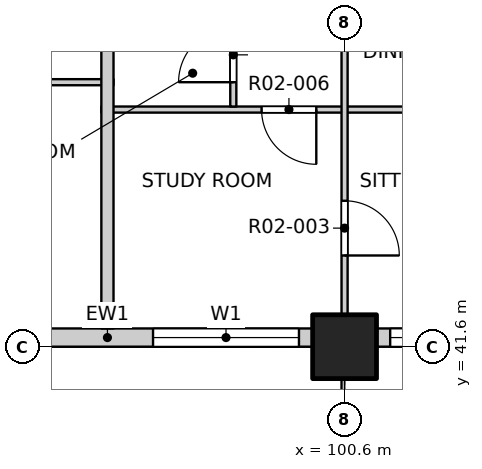
"""IFC4 building model, lengths in metres.
Left out: names, types, materials, properties, quantities, classifications, styles, units other than length and angle.
Written with IfcOpenShell. Run it as: python <this file> out.ifc"""

import sys

from ifc_helpers import new_model, si_unit, direction, frame, frame_2d, origin, origin_2d, place, context, subcontext, project, spatial, rectangle, extrude, element, fill, save


model = new_model("IFC4")
c1 = context("Model", 3, precision=1e-05, world=origin(), true_north=direction((0.0, 1.0)))
c2 = subcontext(c1, "Body", "Model", "MODEL_VIEW")
j1 = project(units=[si_unit("LENGTHUNIT", "METRE"), si_unit("PLANEANGLEUNIT", "RADIAN")], contexts=[c1])
p1 = place(None, origin())
s1 = spatial("IfcSite", under=j1, at=p1, CompositionType="ELEMENT")
p2 = place(p1, origin())
s2 = spatial("IfcBuilding", under=s1, at=p2, CompositionType="ELEMENT")
p3 = place(p2, frame((0.0, 0.0, 29.7)))
s3 = spatial("IfcBuildingStorey", under=s2, at=p3, CompositionType="ELEMENT", Elevation=29.7)
p4 = place(p3, frame((100.6, 41.6, -0.25), z_axis=(0.0, 0.0, 1.0), x_axis=(1.0, 0.0, 0.0)))
e1 = element("IfcColumn", 1, at=p4, inside=s3, PredefinedType="COLUMN", context=c2, shape_type="SweptSolid", body=[
    extrude(rectangle(XDim=1.05, YDim=1.05, at=origin_2d()), origin(), (0.0, 0.0, 1.0), 3.4),
])
p5 = place(p3, frame((93.325, 41.75, 0.0), z_axis=(0.0, 0.0, 1.0), x_axis=(1.0, 0.0, 0.0)))
e2 = element("IfcWall", 2, at=p5, inside=s3, PredefinedType="SOLIDWALL", context=c2, shape_type="SweptSolid", body=[
    extrude(rectangle(XDim=6.75, YDim=0.3, at=frame_2d((3.375, 0.0))), origin(), (0.0, 0.0, 1.0), 2.7),
])
p6 = place(p5, frame((0.525, 0.0, 0.0)))
e3 = element("IfcOpeningElement", 3, at=p6, cuts=e2, PredefinedType="OPENING", context=c2, shape_type="SweptSolid", body=[
    extrude(rectangle(XDim=1.8, YDim=2.4, at=frame_2d((0.9, 1.2))), frame((0.0, 0.16, 0.0), z_axis=(0.0, -1.0, 0.0), x_axis=(1.0, 0.0, 0.0)), (0.0, 0.0, 1.0), 0.32),
])
p7 = place(p5, frame((4.125, 0.0, 0.9)))
e4 = element("IfcOpeningElement", 4, at=p7, cuts=e2, PredefinedType="OPENING", context=c2, shape_type="SweptSolid", body=[
    extrude(rectangle(XDim=2.4, YDim=1.8, at=frame_2d((1.2, 0.9))), frame((0.0, 0.16, 0.0), z_axis=(0.0, -1.0, 0.0), x_axis=(1.0, 0.0, 0.0)), (0.0, 0.0, 1.0), 0.32),
])
p8 = place(p3, frame((101.125, 41.75, 0.0), z_axis=(0.0, 0.0, 1.0), x_axis=(1.0, 0.0, 0.0)))
e5 = element("IfcWall", 5, at=p8, inside=s3, PredefinedType="SOLIDWALL", context=c2, shape_type="SweptSolid", body=[
    extrude(rectangle(XDim=3.375, YDim=0.3, at=frame_2d((1.688, 0.0))), origin(), (0.0, 0.0, 1.0), 2.7),
])
p9 = place(p8, frame((0.225, 0.0, 0.9)))
e6 = element("IfcOpeningElement", 6, at=p9, cuts=e5, PredefinedType="OPENING", context=c2, shape_type="SweptSolid", body=[
    extrude(rectangle(XDim=2.4, YDim=1.8, at=frame_2d((1.2, 0.9))), frame((0.0, 0.16, 0.0), z_axis=(0.0, -1.0, 0.0), x_axis=(1.0, 0.0, 0.0)), (0.0, 0.0, 1.0), 0.32),
])
p10 = place(p3, frame((96.6, 45.5, 0.0), z_axis=(0.0, 0.0, 1.0), x_axis=(1.0, 0.0, 0.0)))
e7 = element("IfcWall", 7, at=p10, inside=s3, PredefinedType="PARTITIONING", context=c2, shape_type="SweptSolid", body=[
    extrude(rectangle(XDim=11.5, YDim=0.1, at=frame_2d((5.75, 0.0))), origin(), (0.0, 0.0, 1.0), 3.15),
])
p11 = place(p10, frame((2.635, 0.0, 0.0)))
e8 = element("IfcOpeningElement", 8, at=p11, cuts=e7, PredefinedType="OPENING", context=c2, shape_type="SweptSolid", body=[
    extrude(rectangle(XDim=0.9, YDim=2.1, at=frame_2d((0.45, 1.05))), frame((0.0, 0.06, 0.0), z_axis=(0.0, -1.0, 0.0), x_axis=(1.0, 0.0, 0.0)), (0.0, 0.0, 1.0), 0.12),
])
p12 = place(p3, frame((81.0, 45.95, 0.0), z_axis=(0.0, 0.0, 1.0), x_axis=(1.0, 0.0, 0.0)))
e9 = element("IfcWall", 9, at=p12, inside=s3, PredefinedType="PARTITIONING", context=c2, shape_type="SweptSolid", body=[
    extrude(rectangle(XDim=15.8, YDim=0.1, at=frame_2d((7.9, 0.0))), origin(), (0.0, 0.0, 1.0), 3.15),
])
p13 = place(p12, frame((0.625, 0.0, 0.0)))
e10 = element("IfcOpeningElement", 10, at=p13, cuts=e9, PredefinedType="OPENING", context=c2, shape_type="SweptSolid", body=[
    extrude(rectangle(XDim=0.9, YDim=2.1, at=frame_2d((0.45, 1.05))), frame((0.0, 0.06, 0.0), z_axis=(0.0, -1.0, 0.0), x_axis=(1.0, 0.0, 0.0)), (0.0, 0.0, 1.0), 0.12),
])
p14 = place(p12, frame((2.575, 0.0, 0.0)))
e11 = element("IfcOpeningElement", 11, at=p14, cuts=e9, PredefinedType="OPENING", context=c2, shape_type="SweptSolid", body=[
    extrude(rectangle(XDim=0.9, YDim=2.1, at=frame_2d((0.45, 1.05))), frame((0.0, 0.06, 0.0), z_axis=(0.0, -1.0, 0.0), x_axis=(1.0, 0.0, 0.0)), (0.0, 0.0, 1.0), 0.12),
])
p15 = place(p12, frame((5.35, 0.0, 0.0)))
e12 = element("IfcOpeningElement", 12, at=p15, cuts=e9, PredefinedType="OPENING", context=c2, shape_type="SweptSolid", body=[
    extrude(rectangle(XDim=1.2, YDim=2.1, at=frame_2d((0.6, 1.05))), frame((0.0, 0.06, 0.0), z_axis=(0.0, -1.0, 0.0), x_axis=(1.0, 0.0, 0.0)), (0.0, 0.0, 1.0), 0.12),
])
p16 = place(p12, frame((8.425, 0.0, 0.0)))
e13 = element("IfcOpeningElement", 13, at=p16, cuts=e9, PredefinedType="OPENING", context=c2, shape_type="SweptSolid", body=[
    extrude(rectangle(XDim=0.9, YDim=2.1, at=frame_2d((0.45, 1.05))), frame((0.0, 0.06, 0.0), z_axis=(0.0, -1.0, 0.0), x_axis=(1.0, 0.0, 0.0)), (0.0, 0.0, 1.0), 0.12),
])
p17 = place(p12, frame((10.375, 0.0, 0.0)))
e14 = element("IfcOpeningElement", 14, at=p17, cuts=e9, PredefinedType="OPENING", context=c2, shape_type="SweptSolid", body=[
    extrude(rectangle(XDim=0.9, YDim=2.1, at=frame_2d((0.45, 1.05))), frame((0.0, 0.06, 0.0), z_axis=(0.0, -1.0, 0.0), x_axis=(1.0, 0.0, 0.0)), (0.0, 0.0, 1.0), 0.12),
])
p18 = place(p12, frame((13.15, 0.0, 0.0)))
e15 = element("IfcOpeningElement", 15, at=p18, cuts=e9, PredefinedType="OPENING", context=c2, shape_type="SweptSolid", body=[
    extrude(rectangle(XDim=1.2, YDim=2.1, at=frame_2d((0.6, 1.05))), frame((0.0, 0.06, 0.0), z_axis=(0.0, -1.0, 0.0), x_axis=(1.0, 0.0, 0.0)), (0.0, 0.0, 1.0), 0.12),
])
p19 = place(p3, frame((96.7, 41.9, 0.0), z_axis=(0.0, 0.0, 1.0), x_axis=(0.0, 1.0, 0.0)))
e16 = element("IfcWall", 16, at=p19, inside=s3, PredefinedType="PARTITIONING", context=c2, shape_type="SweptSolid", body=[
    extrude(rectangle(XDim=11.3, YDim=0.2, at=frame_2d((5.65, 0.0))), origin(), (0.0, 0.0, 1.0), 3.15),
])
p20 = place(p3, frame((98.77, 45.55, 0.0), z_axis=(0.0, 0.0, 1.0), x_axis=(0.0, 1.0, 0.0)))
e17 = element("IfcWall", 17, at=p20, inside=s3, PredefinedType="PARTITIONING", context=c2, shape_type="SweptSolid", body=[
    extrude(rectangle(XDim=8.95, YDim=0.1, at=frame_2d((4.475, 0.0))), origin(), (0.0, 0.0, 1.0), 3.15),
])
p21 = place(p20, frame((0.4, 0.0, 0.0)))
e18 = element("IfcOpeningElement", 18, at=p21, cuts=e17, PredefinedType="OPENING", context=c2, shape_type="SweptSolid", body=[
    extrude(rectangle(XDim=0.9, YDim=2.1, at=frame_2d((0.45, 1.05))), frame((0.0, 0.06, 0.0), z_axis=(0.0, -1.0, 0.0), x_axis=(1.0, 0.0, 0.0)), (0.0, 0.0, 1.0), 0.12),
])
p22 = place(p20, frame((2.5, 0.0, 0.0)))
e19 = element("IfcOpeningElement", 19, at=p22, cuts=e17, PredefinedType="OPENING", context=c2, shape_type="SweptSolid", body=[
    extrude(rectangle(XDim=0.9, YDim=2.1, at=frame_2d((0.45, 1.05))), frame((0.0, 0.06, 0.0), z_axis=(0.0, -1.0, 0.0), x_axis=(1.0, 0.0, 0.0)), (0.0, 0.0, 1.0), 0.12),
])
p23 = place(p20, frame((4.975, 0.0, 0.0)))
e20 = element("IfcOpeningElement", 20, at=p23, cuts=e17, PredefinedType="OPENING", context=c2, shape_type="SweptSolid", body=[
    extrude(rectangle(XDim=0.8, YDim=2.1, at=frame_2d((0.4, 1.05))), frame((0.0, 0.06, 0.0), z_axis=(0.0, -1.0, 0.0), x_axis=(1.0, 0.0, 0.0)), (0.0, 0.0, 1.0), 0.12),
])
p24 = place(p20, frame((7.4, 0.0, 0.0)))
e21 = element("IfcOpeningElement", 21, at=p24, cuts=e17, PredefinedType="OPENING", context=c2, shape_type="SweptSolid", body=[
    extrude(rectangle(XDim=0.8, YDim=2.1, at=frame_2d((0.4, 1.05))), frame((0.0, 0.06, 0.0), z_axis=(0.0, -1.0, 0.0), x_axis=(1.0, 0.0, 0.0)), (0.0, 0.0, 1.0), 0.12),
])
p25 = place(p3, frame((100.6, 41.9, 0.0), z_axis=(0.0, 0.0, 1.0), x_axis=(0.0, 1.0, 0.0)))
e22 = element("IfcWall", 22, at=p25, inside=s3, PredefinedType="PARTITIONING", context=c2, shape_type="SweptSolid", body=[
    extrude(rectangle(XDim=7.5, YDim=0.1, at=frame_2d((3.75, 0.0))), origin(), (0.0, 0.0, 1.0), 2.55),
])
p26 = place(p25, frame((1.2, 0.0, 0.0)))
e23 = element("IfcOpeningElement", 23, at=p26, cuts=e22, PredefinedType="OPENING", context=c2, shape_type="SweptSolid", body=[
    extrude(rectangle(XDim=0.9, YDim=2.1, at=frame_2d((0.45, 1.05))), frame((0.0, 0.06, 0.0), z_axis=(0.0, -1.0, 0.0), x_axis=(1.0, 0.0, 0.0)), (0.0, 0.0, 1.0), 0.12),
])
p27 = place(p25, frame((5.1, 0.0, 0.0)))
e24 = element("IfcOpeningElement", 24, at=p27, cuts=e22, PredefinedType="OPENING", context=c2, shape_type="SweptSolid", body=[
    extrude(rectangle(XDim=0.9, YDim=2.1, at=frame_2d((0.45, 1.05))), frame((0.0, 0.06, 0.0), z_axis=(0.0, -1.0, 0.0), x_axis=(1.0, 0.0, 0.0)), (0.0, 0.0, 1.0), 0.12),
])
p28 = place(p7, origin())
e25 = element("IfcWindow", 25, at=p28, inside=s3, PartitioningType="DOUBLE_PANEL_VERTICAL", PredefinedType="WINDOW", context=c2, shape_type="SweptSolid", body=[
    extrude(rectangle(XDim=2.4, YDim=1.8, at=frame_2d((1.2, 0.9))), frame((0.0, 0.03, 0.0), z_axis=(0.0, -1.0, 0.0), x_axis=(1.0, 0.0, 0.0)), (0.0, 0.0, 1.0), 0.06),
])
fill(e4, e25)
p29 = place(p9, origin())
e26 = element("IfcWindow", 26, at=p29, inside=s3, PartitioningType="DOUBLE_PANEL_VERTICAL", PredefinedType="WINDOW", context=c2, shape_type="SweptSolid", body=[
    extrude(rectangle(XDim=2.4, YDim=1.8, at=frame_2d((1.2, 0.9))), frame((0.0, 0.03, 0.0), z_axis=(0.0, -1.0, 0.0), x_axis=(1.0, 0.0, 0.0)), (0.0, 0.0, 1.0), 0.06),
])
fill(e6, e26)
p30 = place(p26, origin())
e27 = element("IfcDoor", 27, at=p30, inside=s3, OperationType="SINGLE_SWING_RIGHT", PredefinedType="DOOR", context=c2, shape_type="SweptSolid", body=[
    extrude(rectangle(XDim=0.9, YDim=2.1, at=frame_2d((0.45, 1.05))), frame((0.0, 0.025, 0.0), z_axis=(0.0, -1.0, 0.0), x_axis=(1.0, 0.0, 0.0)), (0.0, 0.0, 1.0), 0.05),
])
fill(e23, e27)
p31 = place(p11, origin())
e28 = element("IfcDoor", 28, at=p31, inside=s3, OperationType="SINGLE_SWING_LEFT", PredefinedType="DOOR", context=c2, shape_type="SweptSolid", body=[
    extrude(rectangle(XDim=0.9, YDim=2.1, at=frame_2d((0.45, 1.05))), frame((0.0, 0.025, 0.0), z_axis=(0.0, -1.0, 0.0), x_axis=(1.0, 0.0, 0.0)), (0.0, 0.0, 1.0), 0.05),
])
fill(e8, e28)
p32 = place(p21, origin())
e29 = element("IfcDoor", 29, at=p32, inside=s3, OperationType="SINGLE_SWING_LEFT", PredefinedType="DOOR", context=c2, shape_type="SweptSolid", body=[
    extrude(rectangle(XDim=0.9, YDim=2.1, at=frame_2d((0.45, 1.05))), frame((0.0, 0.025, 0.0), z_axis=(0.0, -1.0, 0.0), x_axis=(1.0, 0.0, 0.0)), (0.0, 0.0, 1.0), 0.05),
])
fill(e18, e29)
save(model, sys.argv[1])
